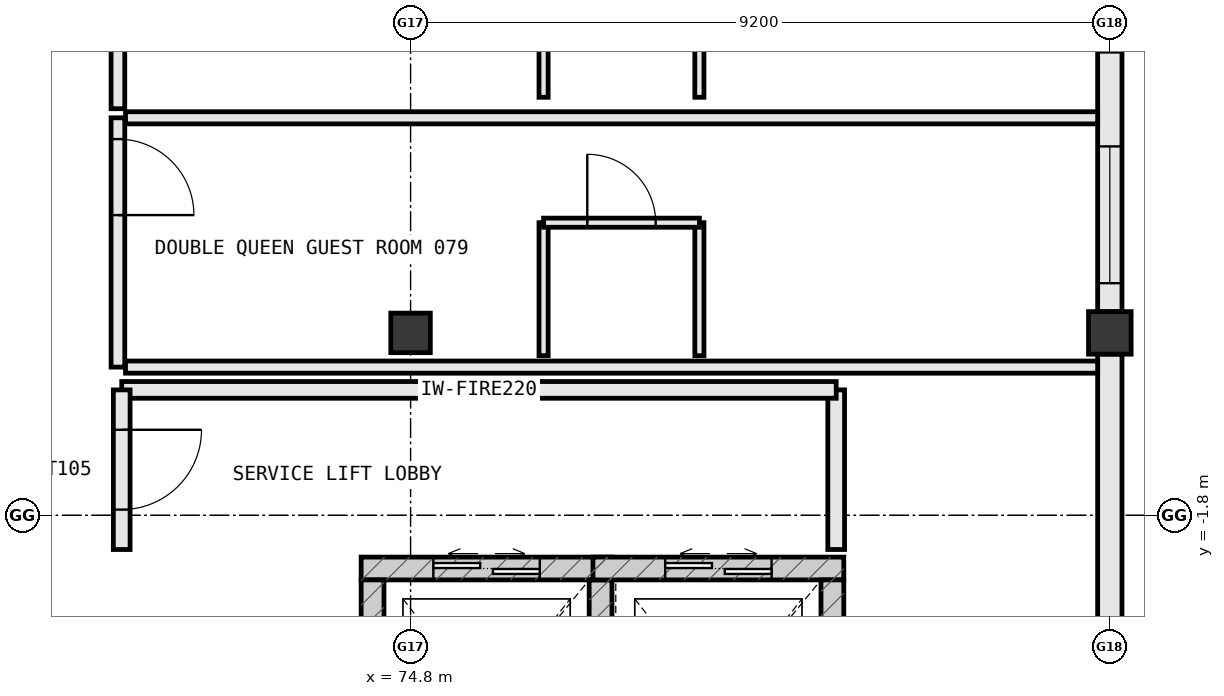
"""IFC4 building model, lengths in metres.
Left out: names, types, materials, properties, quantities, classifications, styles, units other than length and angle.
Written with IfcOpenShell. Run it as: python <this file> out.ifc"""

import sys

from ifc_helpers import new_model, si_unit, direction, frame, frame_2d, origin, origin_2d, place, context, subcontext, project, spatial, rectangle, extrude, element, fill, save


model = new_model("IFC4")
c1 = context("Model", 3, precision=1e-05, world=origin(), true_north=direction((0.0, 1.0)))
c2 = subcontext(c1, "Body", "Model", "MODEL_VIEW")
j1 = project(units=[si_unit("LENGTHUNIT", "METRE"), si_unit("PLANEANGLEUNIT", "RADIAN")], contexts=[c1])
p1 = place(None, origin())
s1 = spatial("IfcSite", under=j1, at=p1, CompositionType="ELEMENT")
p2 = place(p1, origin())
s2 = spatial("IfcBuilding", under=s1, at=p2, CompositionType="ELEMENT")
p3 = place(p2, frame((0.0, 0.0, 16.2)))
s3 = spatial("IfcBuildingStorey", under=s2, at=p3, CompositionType="ELEMENT", Elevation=16.2)
p4 = place(p3, frame((74.8, 0.6, 0.0), z_axis=(0.0, 0.0, 1.0), x_axis=(1.0, 0.0, 0.0)))
e1 = element("IfcColumn", 1, at=p4, inside=s3, PredefinedType="COLUMN", context=c2, shape_type="SweptSolid", body=[
    extrude(rectangle(XDim=0.52, YDim=0.52, at=origin_2d()), origin(), (0.0, 0.0, 1.0), 3.8),
])
p5 = place(p3, frame((84.0, 0.6, 0.0), z_axis=(0.0, 0.0, 1.0), x_axis=(1.0, 0.0, 0.0)))
e2 = element("IfcColumn", 2, at=p5, inside=s3, PredefinedType="COLUMN", context=c2, shape_type="SweptSolid", body=[
    extrude(rectangle(XDim=0.56, YDim=0.56, at=origin_2d()), origin(), (0.0, 0.0, 1.0), 3.8),
])
p6 = place(p3, frame((84.0, -8.722, 0.0), z_axis=(0.0, 0.0, 1.0), x_axis=(0.0, 1.0, 0.0)))
e3 = element("IfcWall", 3, at=p6, inside=s3, PredefinedType="STANDARD", context=c2, shape_type="SweptSolid", body=[
    extrude(rectangle(XDim=9.044, YDim=0.32, at=frame_2d((4.522, 0.0))), origin(), (0.0, 0.0, 1.0), 2.975),
])
p7 = place(p6, frame((1.286, 0.0, 0.85)))
e4 = element("IfcOpeningElement", 4, at=p7, cuts=e3, PredefinedType="OPENING", context=c2, shape_type="SweptSolid", body=[
    extrude(rectangle(XDim=1.95, YDim=1.9, at=frame_2d((0.975, 0.95))), frame((0.0, 0.172, 0.0), z_axis=(0.0, -1.0, 0.0), x_axis=(1.0, 0.0, 0.0)), (0.0, 0.0, 1.0), 0.344),
])
p8 = place(p3, frame((84.0, 0.878, 0.0), z_axis=(0.0, 0.0, 1.0), x_axis=(0.0, 1.0, 0.0)))
e5 = element("IfcWall", 5, at=p8, inside=s3, PredefinedType="STANDARD", context=c2, shape_type="SweptSolid", body=[
    extrude(rectangle(XDim=9.044, YDim=0.32, at=frame_2d((4.522, 0.0))), origin(), (0.0, 0.0, 1.0), 2.975),
])
p9 = place(p8, frame((0.376, 0.0, 0.85)))
e6 = element("IfcOpeningElement", 6, at=p9, cuts=e5, PredefinedType="OPENING", context=c2, shape_type="SweptSolid", body=[
    extrude(rectangle(XDim=1.8, YDim=1.85, at=frame_2d((0.9, 0.925))), frame((0.0, 0.172, 0.0), z_axis=(0.0, -1.0, 0.0), x_axis=(1.0, 0.0, 0.0)), (0.0, 0.0, 1.0), 0.344),
])
p10 = place(p8, frame((3.412, 0.0, 0.85)))
e7 = element("IfcOpeningElement", 7, at=p10, cuts=e5, PredefinedType="OPENING", context=c2, shape_type="SweptSolid", body=[
    extrude(rectangle(XDim=1.8, YDim=1.85, at=frame_2d((0.9, 0.925))), frame((0.0, 0.172, 0.0), z_axis=(0.0, -1.0, 0.0), x_axis=(1.0, 0.0, 0.0)), (0.0, 0.0, 1.0), 0.344),
])
p11 = place(p8, frame((6.658, 0.0, 0.85)))
e8 = element("IfcOpeningElement", 8, at=p11, cuts=e5, PredefinedType="OPENING", context=c2, shape_type="SweptSolid", body=[
    extrude(rectangle(XDim=1.8, YDim=1.85, at=frame_2d((0.9, 0.925))), frame((0.0, 0.172, 0.0), z_axis=(0.0, -1.0, 0.0), x_axis=(1.0, 0.0, 0.0)), (0.0, 0.0, 1.0), 0.344),
])
p12 = place(p3, frame((77.45, -2.5, 0.0), z_axis=(0.0, 0.0, 1.0), x_axis=(-1.0, 0.0, 0.0)))
e9 = element("IfcWall", 9, at=p12, inside=s3, PredefinedType="SHEAR", context=c2, shape_type="SweptSolid", body=[
    extrude(rectangle(XDim=3.3, YDim=0.3, at=frame_2d((1.65, 0.0))), origin(), (0.0, 0.0, 1.0), 3.8),
])
p13 = place(p12, frame((0.95, 0.0, 0.0)))
e10 = element("IfcOpeningElement", 10, at=p13, cuts=e9, PredefinedType="OPENING", context=c2, shape_type="SweptSolid", body=[
    extrude(rectangle(XDim=1.4, YDim=2.2, at=frame_2d((0.7, 1.1))), frame((0.0, 0.162, 0.0), z_axis=(0.0, -1.0, 0.0), x_axis=(1.0, 0.0, 0.0)), (0.0, 0.0, 1.0), 0.324),
])
for number, where, z_axis, x_axis in (
    (11, (77.3, -5.95, 0.0), (0.0, 0.0, 1.0), (0.0, 1.0, 0.0)),
    (12, (74.3, -2.65, 0.0), (0.0, 0.0, 1.0), (0.0, -1.0, 0.0)),
):
    element("IfcWall", number, at=place(p3, frame(where, z_axis=z_axis, x_axis=x_axis)), inside=s3, PredefinedType="SHEAR", context=c2, shape_type="SweptSolid", body=[
        extrude(rectangle(XDim=3.3, YDim=0.3, at=frame_2d((1.65, 0.0))), origin(), (0.0, 0.0, 1.0), 3.8),
    ])
p14 = place(p3, frame((80.5, -2.5, 0.0), z_axis=(0.0, 0.0, 1.0), x_axis=(-1.0, 0.0, 0.0)))
e13 = element("IfcWall", 13, at=p14, inside=s3, PredefinedType="SHEAR", context=c2, shape_type="SweptSolid", body=[
    extrude(rectangle(XDim=3.3, YDim=0.3, at=frame_2d((1.65, 0.0))), origin(), (0.0, 0.0, 1.0), 3.8),
])
p15 = place(p14, frame((0.95, 0.0, 0.0)))
e14 = element("IfcOpeningElement", 14, at=p15, cuts=e13, PredefinedType="OPENING", context=c2, shape_type="SweptSolid", body=[
    extrude(rectangle(XDim=1.4, YDim=2.2, at=frame_2d((0.7, 1.1))), frame((0.0, 0.162, 0.0), z_axis=(0.0, -1.0, 0.0), x_axis=(1.0, 0.0, 0.0)), (0.0, 0.0, 1.0), 0.324),
])
p16 = place(p3, frame((80.35, -5.95, 0.0), z_axis=(0.0, 0.0, 1.0), x_axis=(0.0, 1.0, 0.0)))
e15 = element("IfcWall", 15, at=p16, inside=s3, PredefinedType="SHEAR", context=c2, shape_type="SweptSolid", body=[
    extrude(rectangle(XDim=3.3, YDim=0.3, at=frame_2d((1.65, 0.0))), origin(), (0.0, 0.0, 1.0), 3.8),
])
p17 = place(p3, frame((80.4, -2.25, 0.0), z_axis=(0.0, 0.0, 1.0), x_axis=(0.0, 1.0, 0.0)))
e16 = element("IfcWall", 16, at=p17, inside=s3, PredefinedType="STANDARD", context=c2, shape_type="SweptSolid", body=[
    extrude(rectangle(XDim=2.1, YDim=0.22, at=frame_2d((1.05, 0.0))), origin(), (0.0, 0.0, 1.0), 3.56),
])
p18 = place(p3, frame((80.4, -0.15, 0.0), z_axis=(0.0, 0.0, 1.0), x_axis=(-1.0, 0.0, 0.0)))
e17 = element("IfcWall", 17, at=p18, inside=s3, PredefinedType="STANDARD", context=c2, shape_type="SweptSolid", body=[
    extrude(rectangle(XDim=9.4, YDim=0.22, at=frame_2d((4.7, 0.0))), origin(), (0.0, 0.0, 1.0), 3.56),
])
p19 = place(p3, frame((71.0, -0.15, 0.0), z_axis=(0.0, 0.0, 1.0), x_axis=(0.0, -1.0, 0.0)))
e18 = element("IfcWall", 18, at=p19, inside=s3, PredefinedType="STANDARD", context=c2, shape_type="SweptSolid", body=[
    extrude(rectangle(XDim=2.1, YDim=0.22, at=frame_2d((1.05, 0.0))), origin(), (0.0, 0.0, 1.0), 3.56),
])
p20 = place(p19, frame((0.525, 0.0, 0.0)))
e19 = element("IfcOpeningElement", 19, at=p20, cuts=e18, PredefinedType="OPENING", context=c2, shape_type="SweptSolid", body=[
    extrude(rectangle(XDim=1.05, YDim=2.2, at=frame_2d((0.525, 1.1))), frame((0.0, 0.122, 0.0), z_axis=(0.0, -1.0, 0.0), x_axis=(1.0, 0.0, 0.0)), (0.0, 0.0, 1.0), 0.244),
])
p21 = place(p3, frame((70.95, 3.43, 0.0), z_axis=(0.0, 0.0, 1.0), x_axis=(0.0, -1.0, 0.0)))
e20 = element("IfcWall", 20, at=p21, inside=s3, PredefinedType="PARTITIONING", context=c2, shape_type="SweptSolid", body=[
    extrude(rectangle(XDim=3.28, YDim=0.18, at=frame_2d((1.64, 0.0))), origin(), (0.0, 0.0, 1.0), 3.56),
])
p22 = place(p21, frame((0.28, 0.0, 0.0)))
e21 = element("IfcOpeningElement", 21, at=p22, cuts=e20, PredefinedType="OPENING", context=c2, shape_type="SweptSolid", body=[
    extrude(rectangle(XDim=1.0, YDim=2.2, at=frame_2d((0.5, 1.1))), frame((0.0, 0.102, 0.0), z_axis=(0.0, -1.0, 0.0), x_axis=(1.0, 0.0, 0.0)), (0.0, 0.0, 1.0), 0.204),
])
for number, where, z_axis, x_axis in (
    (22, (71.05, 0.15, 0.0), (0.0, 0.0, 1.0), (1.0, 0.0, 0.0)),
    (23, (71.05, 3.43, 0.0), (0.0, 0.0, 1.0), (1.0, 0.0, 0.0)),
):
    element("IfcWall", number, at=place(p3, frame(where, z_axis=z_axis, x_axis=x_axis)), inside=s3, PredefinedType="PARTITIONING", context=c2, shape_type="SweptSolid", body=[
        extrude(rectangle(XDim=12.79, YDim=0.16, at=frame_2d((6.395, 0.0))), origin(), (0.0, 0.0, 1.0), 3.56),
    ])
for number, where, z_axis, x_axis in (
    (24, (76.55, 0.3, 0.0), (0.0, 0.0, 1.0), (0.0, 1.0, 0.0)),
    (25, (78.6, 0.3, 0.0), (0.0, 0.0, 1.0), (0.0, 1.0, 0.0)),
):
    element("IfcWall", number, at=place(p3, frame(where, z_axis=z_axis, x_axis=x_axis)), inside=s3, PredefinedType="PARTITIONING", context=c2, shape_type="SweptSolid", body=[
        extrude(rectangle(XDim=1.75, YDim=0.12, at=frame_2d((0.875, 0.0))), origin(), (0.0, 0.0, 1.0), 3.56),
    ])
p23 = place(p3, frame((76.55, 2.05, 0.0), z_axis=(0.0, 0.0, 1.0), x_axis=(1.0, 0.0, 0.0)))
e26 = element("IfcWall", 26, at=p23, inside=s3, PredefinedType="PARTITIONING", context=c2, shape_type="SweptSolid", body=[
    extrude(rectangle(XDim=2.05, YDim=0.12, at=frame_2d((1.025, 0.0))), origin(), (0.0, 0.0, 1.0), 3.56),
])
p24 = place(p23, frame((0.575, 0.0, 0.0)))
e27 = element("IfcOpeningElement", 27, at=p24, cuts=e26, PredefinedType="OPENING", context=c2, shape_type="SweptSolid", body=[
    extrude(rectangle(XDim=0.9, YDim=2.15, at=frame_2d((0.45, 1.075))), frame((0.0, 0.072, 0.0), z_axis=(0.0, -1.0, 0.0), x_axis=(1.0, 0.0, 0.0)), (0.0, 0.0, 1.0), 0.144),
])
p25 = place(p3, frame((70.95, 6.83, 0.0), z_axis=(0.0, 0.0, 1.0), x_axis=(0.0, -1.0, 0.0)))
e28 = element("IfcWall", 28, at=p25, inside=s3, PredefinedType="PARTITIONING", context=c2, shape_type="SweptSolid", body=[
    extrude(rectangle(XDim=3.28, YDim=0.18, at=frame_2d((1.64, 0.0))), origin(), (0.0, 0.0, 1.0), 3.56),
])
p26 = place(p25, frame((0.28, 0.0, 0.0)))
e29 = element("IfcOpeningElement", 29, at=p26, cuts=e28, PredefinedType="OPENING", context=c2, shape_type="SweptSolid", body=[
    extrude(rectangle(XDim=1.0, YDim=2.2, at=frame_2d((0.5, 1.1))), frame((0.0, 0.102, 0.0), z_axis=(0.0, -1.0, 0.0), x_axis=(1.0, 0.0, 0.0)), (0.0, 0.0, 1.0), 0.204),
])
for number, where, z_axis, x_axis in (
    (30, (76.55, 3.7, 0.0), (0.0, 0.0, 1.0), (0.0, 1.0, 0.0)),
    (31, (78.6, 3.7, 0.0), (0.0, 0.0, 1.0), (0.0, 1.0, 0.0)),
):
    element("IfcWall", number, at=place(p3, frame(where, z_axis=z_axis, x_axis=x_axis)), inside=s3, PredefinedType="PARTITIONING", context=c2, shape_type="SweptSolid", body=[
        extrude(rectangle(XDim=1.75, YDim=0.12, at=frame_2d((0.875, 0.0))), origin(), (0.0, 0.0, 1.0), 3.56),
    ])
p27 = place(p9, origin())
e32 = element("IfcWindow", 32, at=p27, inside=s3, PartitioningType="SINGLE_PANEL", PredefinedType="WINDOW", context=c2, shape_type="SweptSolid", body=[
    extrude(rectangle(XDim=1.8, YDim=1.85, at=frame_2d((0.9, 0.925))), frame((0.0, 0.03, 0.0), z_axis=(0.0, -1.0, 0.0), x_axis=(1.0, 0.0, 0.0)), (0.0, 0.0, 1.0), 0.06),
])
fill(e6, e32)
p28 = place(p10, origin())
e33 = element("IfcWindow", 33, at=p28, inside=s3, PartitioningType="SINGLE_PANEL", PredefinedType="WINDOW", context=c2, shape_type="SweptSolid", body=[
    extrude(rectangle(XDim=1.8, YDim=1.85, at=frame_2d((0.9, 0.925))), frame((0.0, 0.03, 0.0), z_axis=(0.0, -1.0, 0.0), x_axis=(1.0, 0.0, 0.0)), (0.0, 0.0, 1.0), 0.06),
])
fill(e7, e33)
p29 = place(p13, origin())
e34 = element("IfcDoor", 34, at=p29, inside=s3, OperationType="DOUBLE_DOOR_SLIDING", PredefinedType="DOOR", context=c2, shape_type="SweptSolid", body=[
    extrude(rectangle(XDim=1.4, YDim=2.2, at=frame_2d((0.7, 1.1))), frame((0.0, 0.025, 0.0), z_axis=(0.0, -1.0, 0.0), x_axis=(1.0, 0.0, 0.0)), (0.0, 0.0, 1.0), 0.05),
])
fill(e10, e34)
p30 = place(p15, origin())
e35 = element("IfcDoor", 35, at=p30, inside=s3, OperationType="DOUBLE_DOOR_SLIDING", PredefinedType="DOOR", context=c2, shape_type="SweptSolid", body=[
    extrude(rectangle(XDim=1.4, YDim=2.2, at=frame_2d((0.7, 1.1))), frame((0.0, 0.025, 0.0), z_axis=(0.0, -1.0, 0.0), x_axis=(1.0, 0.0, 0.0)), (0.0, 0.0, 1.0), 0.05),
])
fill(e14, e35)
p31 = place(p20, origin())
e36 = element("IfcDoor", 36, at=p31, inside=s3, OperationType="SINGLE_SWING_LEFT", PredefinedType="DOOR", context=c2, shape_type="SweptSolid", body=[
    extrude(rectangle(XDim=1.05, YDim=2.2, at=frame_2d((0.525, 1.1))), frame((0.0, 0.025, 0.0), z_axis=(0.0, -1.0, 0.0), x_axis=(1.0, 0.0, 0.0)), (0.0, 0.0, 1.0), 0.05),
])
fill(e19, e36)
p32 = place(p22, origin())
e37 = element("IfcDoor", 37, at=p32, inside=s3, OperationType="SINGLE_SWING_RIGHT", PredefinedType="DOOR", context=c2, shape_type="SweptSolid", body=[
    extrude(rectangle(XDim=1.0, YDim=2.2, at=frame_2d((0.5, 1.1))), frame((0.0, 0.025, 0.0), z_axis=(0.0, -1.0, 0.0), x_axis=(1.0, 0.0, 0.0)), (0.0, 0.0, 1.0), 0.05),
])
fill(e21, e37)
p33 = place(p24, origin())
e38 = element("IfcDoor", 38, at=p33, inside=s3, OperationType="SINGLE_SWING_LEFT", PredefinedType="DOOR", context=c2, shape_type="SweptSolid", body=[
    extrude(rectangle(XDim=0.9, YDim=2.15, at=frame_2d((0.45, 1.075))), frame((0.0, 0.025, 0.0), z_axis=(0.0, -1.0, 0.0), x_axis=(1.0, 0.0, 0.0)), (0.0, 0.0, 1.0), 0.05),
])
fill(e27, e38)
save(model, sys.argv[1])
